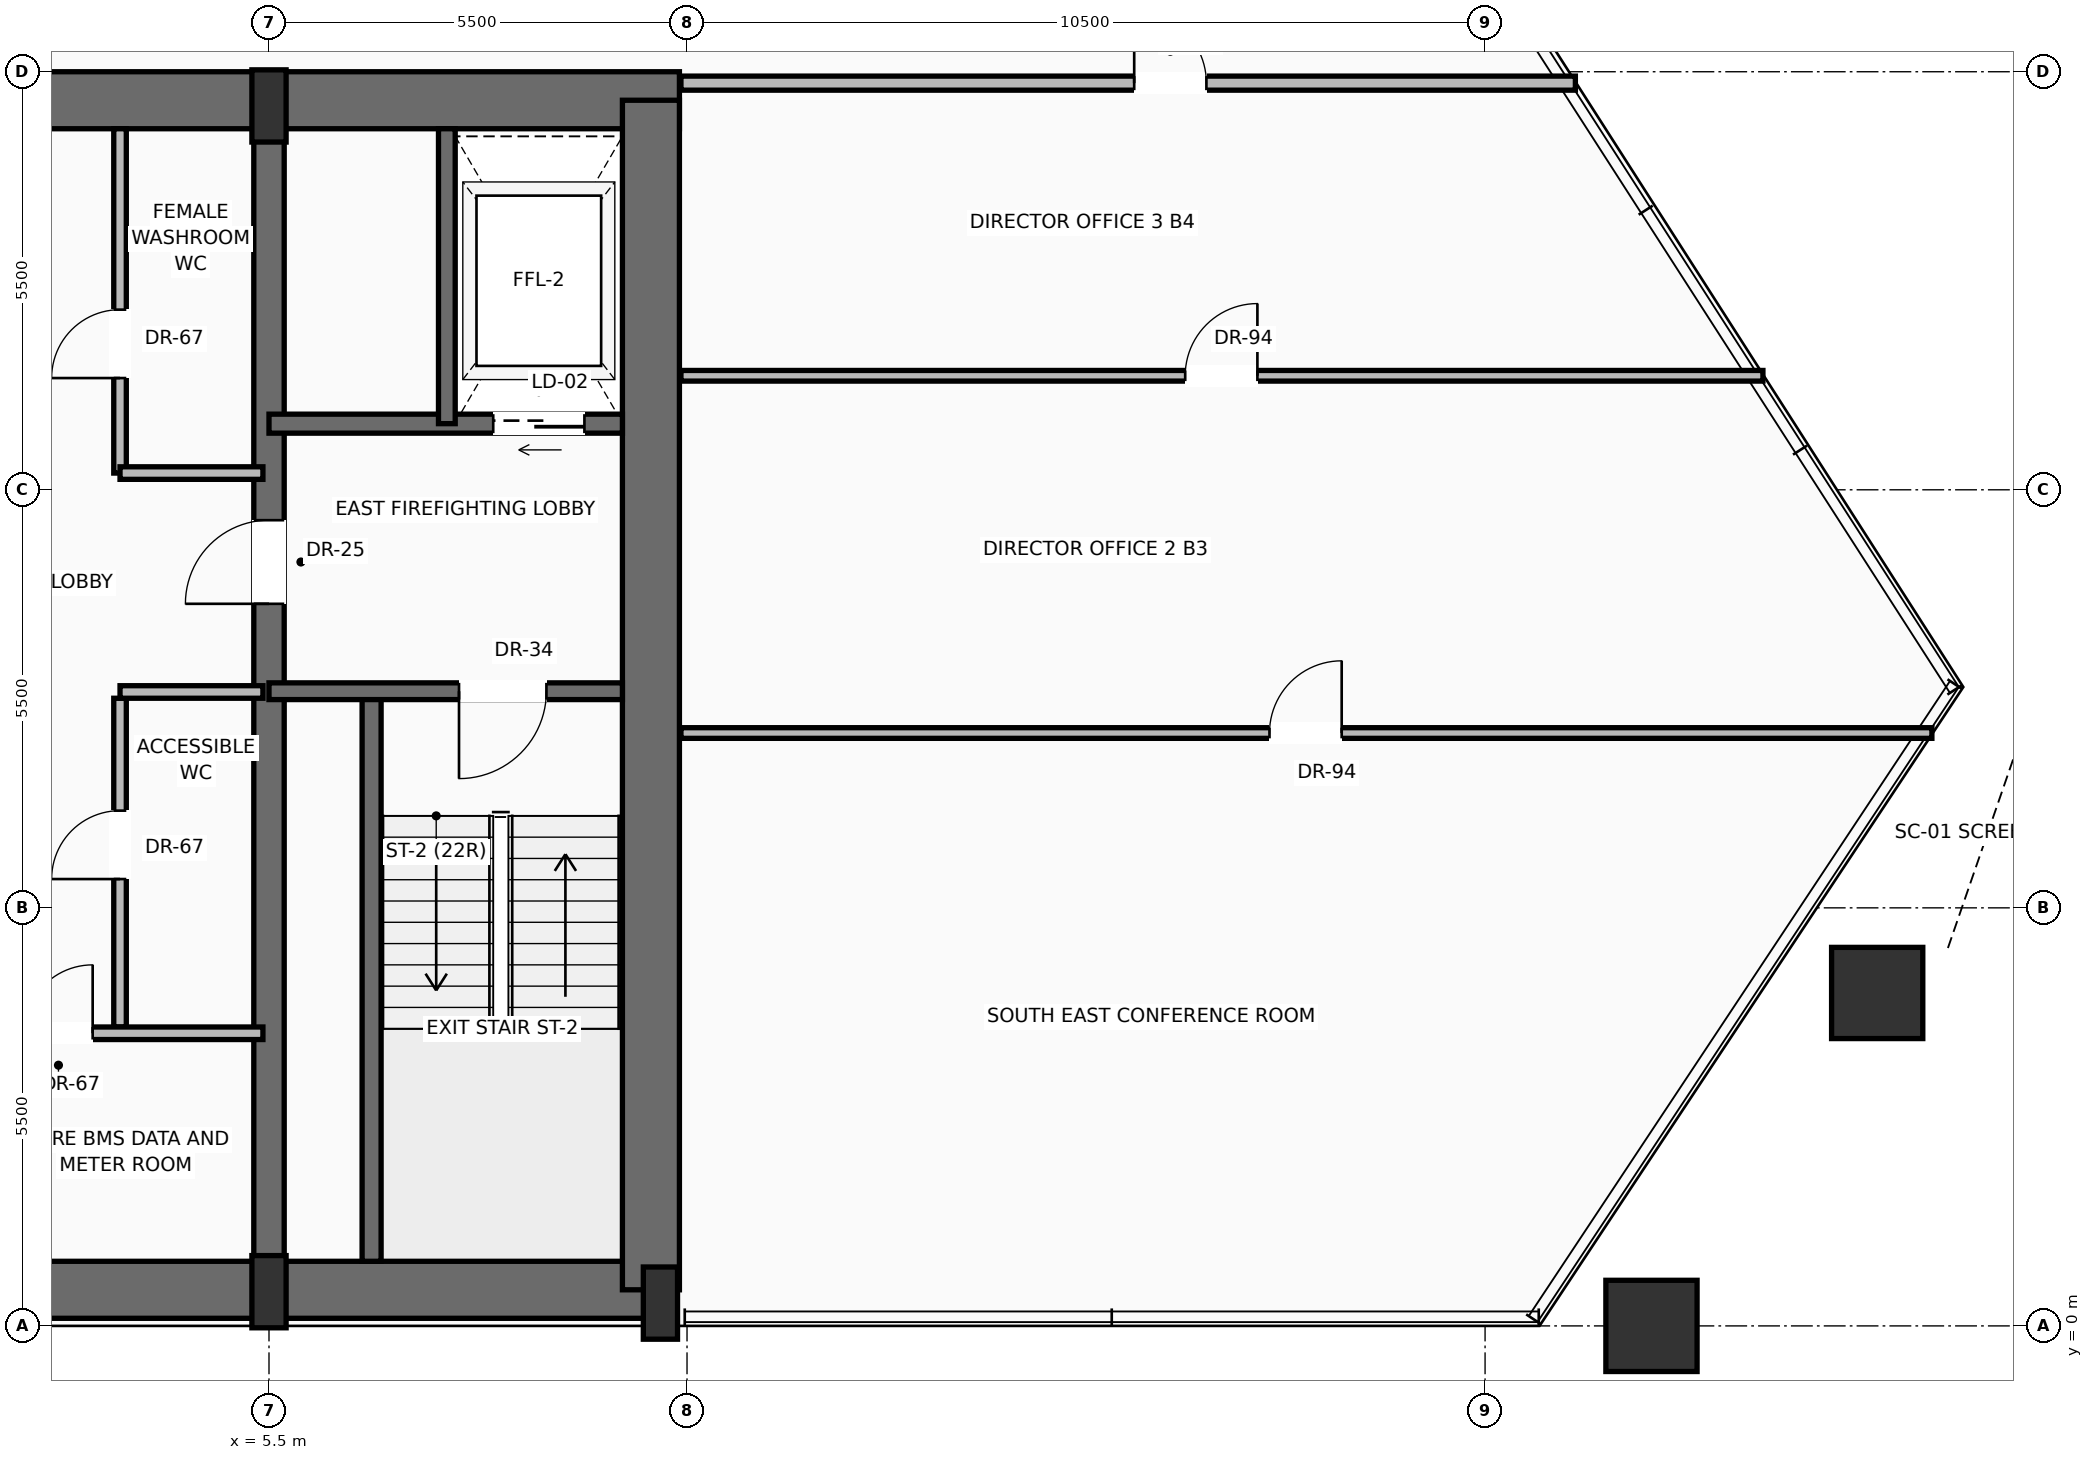
"""IFC4 building model, lengths in metres.
Left out: names, types, materials, properties, quantities, classifications, styles, units other than length and angle.
Written with IfcOpenShell. Run it as: python <this file> out.ifc"""

import sys

from ifc_helpers import new_model, si_unit, direction, frame, frame_2d, origin, origin_2d, place, context, subcontext, project, spatial, rectangle, hollow_rectangle, extrude, source, transform, mapped, element, fill, save


model = new_model("IFC4")
c1 = context("Model", 3, precision=1e-05, world=origin(), true_north=direction((0.0, 1.0)))
c2 = subcontext(c1, "Body", "Model", "MODEL_VIEW")
j1 = project(units=[si_unit("LENGTHUNIT", "METRE"), si_unit("PLANEANGLEUNIT", "RADIAN")], contexts=[c1])
p1 = place(None, origin())
s1 = spatial("IfcSite", under=j1, at=p1, CompositionType="ELEMENT")
p2 = place(p1, origin())
s2 = spatial("IfcBuilding", under=s1, at=p2, CompositionType="ELEMENT")
p3 = place(p2, frame((0.0, 0.0, 117.3)))
s3 = spatial("IfcBuildingStorey", under=s2, at=p3, CompositionType="ELEMENT", Elevation=117.3)
p4 = place(p3, frame((-10.65, 0.475, 0.0), z_axis=(0.0, 0.0, 1.0), x_axis=(1.0, 0.0, 0.0)))
e1 = element("IfcWall", 1, at=p4, inside=s3, PredefinedType="SHEAR", context=c2, shape_type="SweptSolid", body=[
    extrude(rectangle(XDim=21.3, YDim=0.75, at=frame_2d((10.65, 0.0))), origin(), (0.0, 0.0, 1.0), 3.42),
])
p5 = place(p3, frame((-10.9, 16.125, 0.0), z_axis=(0.0, 0.0, 1.0), x_axis=(1.0, 0.0, 0.0)))
e2 = element("IfcWall", 2, at=p5, inside=s3, PredefinedType="SHEAR", context=c2, shape_type="SweptSolid", body=[
    extrude(rectangle(XDim=21.8, YDim=0.75, at=frame_2d((10.9, 0.0))), origin(), (0.0, 0.0, 1.0), 3.42),
])
p6 = place(p5, frame((3.47, 0.0, 0.0)))
e3 = element("IfcOpeningElement", 3, at=p6, cuts=e2, PredefinedType="OPENING", context=c2, shape_type="SweptSolid", body=[
    extrude(rectangle(XDim=1.3, YDim=2.3, at=frame_2d((0.65, 1.15))), frame((0.0, 0.385, 0.0), z_axis=(0.0, -1.0, 0.0), x_axis=(1.0, 0.0, 0.0)), (0.0, 0.0, 1.0), 0.77),
])
p7 = place(p5, frame((9.9, 0.0, 0.0)))
e4 = element("IfcOpeningElement", 4, at=p7, cuts=e2, PredefinedType="OPENING", context=c2, shape_type="SweptSolid", body=[
    extrude(rectangle(XDim=2.0, YDim=2.4, at=frame_2d((1.0, 1.2))), frame((0.0, 0.385, 0.0), z_axis=(0.0, -1.0, 0.0), x_axis=(1.0, 0.0, 0.0)), (0.0, 0.0, 1.0), 0.77),
])
p8 = place(p3, frame((10.525, 0.475, 0.0), z_axis=(0.0, 0.0, 1.0), x_axis=(0.0, 1.0, 0.0)))
e5 = element("IfcWall", 5, at=p8, inside=s3, PredefinedType="SHEAR", context=c2, shape_type="SweptSolid", body=[
    extrude(rectangle(XDim=15.65, YDim=0.75, at=frame_2d((7.825, 0.0))), origin(), (0.0, 0.0, 1.0), 3.42),
])
p9 = place(p3, frame((5.5, 0.475, 0.0), z_axis=(0.0, 0.0, 1.0), x_axis=(0.0, 1.0, 0.0)))
e6 = element("IfcWall", 6, at=p9, inside=s3, PredefinedType="SHEAR", context=c2, shape_type="SweptSolid", body=[
    extrude(rectangle(XDim=15.65, YDim=0.4, at=frame_2d((7.825, 0.0))), origin(), (0.0, 0.0, 1.0), 3.42),
])
p10 = place(p9, frame((9.025, 0.0, 0.0)))
e7 = element("IfcOpeningElement", 7, at=p10, cuts=e6, PredefinedType="OPENING", context=c2, shape_type="SweptSolid", body=[
    extrude(rectangle(XDim=1.1, YDim=2.2, at=frame_2d((0.55, 1.1))), frame((0.0, 0.21, 0.0), z_axis=(0.0, -1.0, 0.0), x_axis=(1.0, 0.0, 0.0)), (0.0, 0.0, 1.0), 0.42),
])
m1 = source(origin(), c2, "Body", "SweptSolid", [
    extrude(rectangle(XDim=0.45, YDim=0.95, at=origin_2d()), origin(), (0.0, 0.0, 1.0), 3.7),
])
for number, where, z_axis, x_axis in (
    (8, (5.5, 0.45, 0.0), (0.0, 0.0, 1.0), (1.0, 0.0, 0.0)),
    (9, (10.65, 0.3, 0.0), (0.0, 0.0, 1.0), (1.0, 0.0, 0.0)),
    (10, (5.5, 16.05, 0.0), (0.0, 0.0, 1.0), (1.0, 0.0, 0.0)),
):
    element("IfcColumn", number, at=place(p3, frame(where, z_axis=z_axis, x_axis=x_axis)), inside=s3, PredefinedType="PILASTER", context=c2, shape_type="MappedRepresentation", body=[
        mapped(m1, transform((0.0, 0.0, 0.0), scale=1.0)),
    ])
m2 = source(origin(), c2, "Body", "SweptSolid", [
    extrude(hollow_rectangle(XDim=1.2, YDim=1.2, WallThickness=0.06, at=origin_2d()), origin(), (0.0, 0.0, 1.0), 3.691),
])
p11 = place(p3, frame((23.689, 0.0, 0.004), z_axis=(0.010449856009, 0.0, 0.999945398764), x_axis=(0.0, 1.0, 0.0)))
e11 = element("IfcColumn", 11, at=p11, inside=s3, PredefinedType="COLUMN", context=c2, shape_type="MappedRepresentation", body=[
    mapped(m2, transform((0.0, 0.0, 0.0), scale=1.0)),
])
m3 = source(origin(), c2, "Body", "SweptSolid", [
    extrude(hollow_rectangle(XDim=1.2, YDim=1.2, WallThickness=0.06, at=origin_2d()), origin(), (0.0, 0.0, 1.0), 3.692),
])
p12 = place(p3, frame((26.659, 4.38, 0.004), z_axis=(-0.002248546376, -0.015607557197, 0.999875666369), x_axis=(0.989781037653, -0.142595573221, 0.0)))
e12 = element("IfcColumn", 12, at=p12, inside=s3, PredefinedType="COLUMN", context=c2, shape_type="MappedRepresentation", body=[
    mapped(m3, transform((0.0, 0.0, 0.0), scale=1.0)),
])
p13 = place(p3, frame((6.85, 0.85, 0.0), z_axis=(0.0, 0.0, 1.0), x_axis=(0.0, 1.0, 0.0)))
e13 = element("IfcWall", 13, at=p13, inside=s3, PredefinedType="SOLIDWALL", context=c2, shape_type="SweptSolid", body=[
    extrude(rectangle(XDim=7.5, YDim=0.25, at=frame_2d((3.75, 0.0))), origin(), (0.0, 0.0, 1.0), 3.42),
])
p14 = place(p3, frame((10.15, 8.35, 0.0), z_axis=(0.0, 0.0, 1.0), x_axis=(-1.0, 0.0, 0.0)))
e14 = element("IfcWall", 14, at=p14, inside=s3, PredefinedType="SOLIDWALL", context=c2, shape_type="SweptSolid", body=[
    extrude(rectangle(XDim=4.65, YDim=0.22, at=frame_2d((2.325, 0.0))), origin(), (0.0, 0.0, 1.0), 3.42),
])
p15 = place(p14, frame((1.0, 0.0, 0.0)))
e15 = element("IfcOpeningElement", 15, at=p15, cuts=e14, PredefinedType="OPENING", context=c2, shape_type="SweptSolid", body=[
    extrude(rectangle(XDim=1.15, YDim=2.2, at=frame_2d((0.575, 1.1))), frame((0.0, 0.12, 0.0), z_axis=(0.0, -1.0, 0.0), x_axis=(1.0, 0.0, 0.0)), (0.0, 0.0, 1.0), 0.24),
])
p16 = place(p3, frame((10.15, 11.87, 0.0), z_axis=(0.0, 0.0, 1.0), x_axis=(-1.0, 0.0, 0.0)))
e16 = element("IfcWall", 16, at=p16, inside=s3, PredefinedType="SOLIDWALL", context=c2, shape_type="SweptSolid", body=[
    extrude(rectangle(XDim=4.65, YDim=0.25, at=frame_2d((2.325, 0.0))), origin(), (0.0, 0.0, 1.0), 3.42),
])
p17 = place(p16, frame((0.5, 0.0, 0.0)))
e17 = element("IfcOpeningElement", 17, at=p17, cuts=e16, PredefinedType="OPENING", context=c2, shape_type="SweptSolid", body=[
    extrude(rectangle(XDim=1.2, YDim=2.25, at=frame_2d((0.6, 1.125))), frame((0.0, 0.135, 0.0), z_axis=(0.0, -1.0, 0.0), x_axis=(1.0, 0.0, 0.0)), (0.0, 0.0, 1.0), 0.27),
])
p18 = place(p3, frame((7.84, 11.87, 0.0), z_axis=(0.0, 0.0, 1.0), x_axis=(0.0, 1.0, 0.0)))
e18 = element("IfcWall", 18, at=p18, inside=s3, PredefinedType="SOLIDWALL", context=c2, shape_type="SweptSolid", body=[
    extrude(rectangle(XDim=3.88, YDim=0.22, at=frame_2d((1.94, 0.0))), origin(), (0.0, 0.0, 1.0), 3.42),
])
p19 = place(p3, frame((3.54, 3.933, 0.0), z_axis=(0.0, 0.0, 1.0), x_axis=(0.0, 1.0, 0.0)))
e19 = element("IfcWall", 19, at=p19, inside=s3, PredefinedType="PARTITIONING", context=c2, shape_type="SweptSolid", body=[
    extrude(rectangle(XDim=4.325, YDim=0.165, at=frame_2d((2.163, 0.0))), origin(), (0.0, 0.0, 1.0), 3.412),
])
p20 = place(p19, frame((1.946, 0.0, 0.0)))
e20 = element("IfcOpeningElement", 20, at=p20, cuts=e19, PredefinedType="OPENING", context=c2, shape_type="SweptSolid", body=[
    extrude(rectangle(XDim=0.9, YDim=2.1, at=frame_2d((0.45, 1.05))), frame((0.0, 0.093, 0.0), z_axis=(0.0, -1.0, 0.0), x_axis=(1.0, 0.0, 0.0)), (0.0, 0.0, 1.0), 0.185),
])
p21 = place(p3, frame((3.54, 8.34, 0.0), z_axis=(0.0, 0.0, 1.0), x_axis=(1.0, 0.0, 0.0)))
e21 = element("IfcWall", 21, at=p21, inside=s3, PredefinedType="PARTITIONING", context=c2, shape_type="SweptSolid", body=[
    extrude(rectangle(XDim=1.88, YDim=0.165, at=frame_2d((0.94, 0.0))), origin(), (0.0, 0.0, 1.0), 3.412),
])
p22 = place(p3, frame((1.8, 3.85, 0.0), z_axis=(0.0, 0.0, 1.0), x_axis=(1.0, 0.0, 0.0)))
e22 = element("IfcWall", 22, at=p22, inside=s3, PredefinedType="PARTITIONING", context=c2, shape_type="SweptSolid", body=[
    extrude(rectangle(XDim=3.62, YDim=0.165, at=frame_2d((1.81, 0.0))), origin(), (0.0, 0.0, 1.0), 3.412),
])
p23 = place(p22, frame((0.48, 0.0, 0.0)))
e23 = element("IfcOpeningElement", 23, at=p23, cuts=e22, PredefinedType="OPENING", context=c2, shape_type="SweptSolid", body=[
    extrude(rectangle(XDim=0.9, YDim=2.1, at=frame_2d((0.45, 1.05))), frame((0.0, 0.093, 0.0), z_axis=(0.0, -1.0, 0.0), x_axis=(1.0, 0.0, 0.0)), (0.0, 0.0, 1.0), 0.185),
])
p24 = place(p3, frame((3.54, 11.22, 0.0), z_axis=(0.0, 0.0, 1.0), x_axis=(0.0, 1.0, 0.0)))
e24 = element("IfcWall", 24, at=p24, inside=s3, PredefinedType="PARTITIONING", context=c2, shape_type="SweptSolid", body=[
    extrude(rectangle(XDim=4.53, YDim=0.165, at=frame_2d((2.265, 0.0))), origin(), (0.0, 0.0, 1.0), 3.412),
])
p25 = place(p24, frame((1.25, 0.0, 0.0)))
e25 = element("IfcOpeningElement", 25, at=p25, cuts=e24, PredefinedType="OPENING", context=c2, shape_type="SweptSolid", body=[
    extrude(rectangle(XDim=0.9, YDim=2.1, at=frame_2d((0.45, 1.05))), frame((0.0, 0.093, 0.0), z_axis=(0.0, -1.0, 0.0), x_axis=(1.0, 0.0, 0.0)), (0.0, 0.0, 1.0), 0.185),
])
p26 = place(p3, frame((3.54, 11.22, 0.0), z_axis=(0.0, 0.0, 1.0), x_axis=(1.0, 0.0, 0.0)))
e26 = element("IfcWall", 26, at=p26, inside=s3, PredefinedType="PARTITIONING", context=c2, shape_type="SweptSolid", body=[
    extrude(rectangle(XDim=1.88, YDim=0.165, at=frame_2d((0.94, 0.0))), origin(), (0.0, 0.0, 1.0), 3.412),
])
p27 = place(p3, frame((10.92, 16.35, 0.0), z_axis=(0.0, 0.0, 1.0), x_axis=(1.0, 0.0, 0.0)))
e27 = element("IfcWall", 27, at=p27, inside=s3, PredefinedType="PARTITIONING", context=c2, shape_type="SweptSolid", body=[
    extrude(rectangle(XDim=11.768, YDim=0.185, at=frame_2d((5.884, 0.0))), origin(), (0.0, 0.0, 1.0), 2.717),
])
p28 = place(p27, frame((5.963, 0.0, 0.0)))
e28 = element("IfcOpeningElement", 28, at=p28, cuts=e27, PredefinedType="OPENING", context=c2, shape_type="SweptSolid", body=[
    extrude(rectangle(XDim=0.95, YDim=2.2, at=frame_2d((0.475, 1.1))), frame((0.0, 0.103, 0.0), z_axis=(0.0, -1.0, 0.0), x_axis=(1.0, 0.0, 0.0)), (0.0, 0.0, 1.0), 0.205),
])
p29 = place(p3, frame((10.92, 7.8, 0.0), z_axis=(0.0, 0.0, 1.0), x_axis=(1.0, 0.0, 0.0)))
e29 = element("IfcWall", 29, at=p29, inside=s3, PredefinedType="PARTITIONING", context=c2, shape_type="SweptSolid", body=[
    extrude(rectangle(XDim=16.459, YDim=0.14, at=frame_2d((8.229, 0.0))), origin(), (0.0, 0.0, 1.0), 3.412),
])
p30 = place(p29, frame((7.743, 0.0, 0.0)))
e30 = element("IfcOpeningElement", 30, at=p30, cuts=e29, PredefinedType="OPENING", context=c2, shape_type="SweptSolid", body=[
    extrude(rectangle(XDim=0.95, YDim=2.2, at=frame_2d((0.475, 1.1))), frame((0.0, 0.08, 0.0), z_axis=(0.0, -1.0, 0.0), x_axis=(1.0, 0.0, 0.0)), (0.0, 0.0, 1.0), 0.16),
])
p31 = place(p3, frame((10.92, 12.5, 0.0), z_axis=(0.0, 0.0, 1.0), x_axis=(1.0, 0.0, 0.0)))
e31 = element("IfcWall", 31, at=p31, inside=s3, PredefinedType="PARTITIONING", context=c2, shape_type="SweptSolid", body=[
    extrude(rectangle(XDim=14.236, YDim=0.14, at=frame_2d((7.118, 0.0))), origin(), (0.0, 0.0, 1.0), 3.412),
])
p32 = place(p31, frame((6.635, 0.0, 0.0)))
e32 = element("IfcOpeningElement", 32, at=p32, cuts=e31, PredefinedType="OPENING", context=c2, shape_type="SweptSolid", body=[
    extrude(rectangle(XDim=0.95, YDim=2.2, at=frame_2d((0.475, 1.1))), frame((0.0, 0.08, 0.0), z_axis=(0.0, -1.0, 0.0), x_axis=(1.0, 0.0, 0.0)), (0.0, 0.0, 1.0), 0.16),
])
m4 = source(origin(), c2, "Body", "SweptSolid", [
    extrude(rectangle(XDim=1.15, YDim=2.2, at=frame_2d((0.575, 1.1))), frame((0.0, 0.025, 0.0), z_axis=(0.0, -1.0, 0.0), x_axis=(1.0, 0.0, 0.0)), (0.0, 0.0, 1.0), 0.05),
])
p33 = place(p15, origin())
e33 = element("IfcDoor", 33, at=p33, inside=s3, OperationType="SINGLE_SWING_RIGHT", PredefinedType="DOOR", context=c2, shape_type="MappedRepresentation", body=[
    mapped(m4, transform((0.0, 0.0, 0.0), scale=1.0)),
])
fill(e15, e33)
m5 = source(origin(), c2, "Body", "SweptSolid", [
    extrude(rectangle(XDim=1.1, YDim=2.2, at=frame_2d((0.55, 1.1))), frame((0.0, 0.025, 0.0), z_axis=(0.0, -1.0, 0.0), x_axis=(1.0, 0.0, 0.0)), (0.0, 0.0, 1.0), 0.05),
])
p34 = place(p10, origin())
e34 = element("IfcDoor", 34, at=p34, inside=s3, OperationType="SINGLE_SWING_LEFT", PredefinedType="DOOR", context=c2, shape_type="MappedRepresentation", body=[
    mapped(m5, transform((0.0, 0.0, 0.0), scale=1.0)),
])
fill(e7, e34)
m6 = source(origin(), c2, "Body", "SweptSolid", [
    extrude(rectangle(XDim=1.2, YDim=2.25, at=frame_2d((0.6, 1.125))), frame((0.0, 0.025, 0.0), z_axis=(0.0, -1.0, 0.0), x_axis=(1.0, 0.0, 0.0)), (0.0, 0.0, 1.0), 0.05),
])
p35 = place(p17, origin())
e35 = element("IfcDoor", 35, at=p35, inside=s3, OperationType="SLIDING_TO_RIGHT", PredefinedType="DOOR", context=c2, shape_type="MappedRepresentation", body=[
    mapped(m6, transform((0.0, 0.0, 0.0), scale=1.0)),
])
fill(e17, e35)
m7 = source(origin(), c2, "Body", "SweptSolid", [
    extrude(rectangle(XDim=0.9, YDim=2.1, at=frame_2d((0.45, 1.05))), frame((0.0, 0.025, 0.0), z_axis=(0.0, -1.0, 0.0), x_axis=(1.0, 0.0, 0.0)), (0.0, 0.0, 1.0), 0.05),
])
p36 = place(p23, origin())
e36 = element("IfcDoor", 36, at=p36, inside=s3, OperationType="SINGLE_SWING_RIGHT", PredefinedType="DOOR", context=c2, shape_type="MappedRepresentation", body=[
    mapped(m7, transform((0.0, 0.0, 0.0), scale=1.0)),
])
fill(e23, e36)
p37 = place(p20, origin())
e37 = element("IfcDoor", 37, at=p37, inside=s3, OperationType="SINGLE_SWING_LEFT", PredefinedType="DOOR", context=c2, shape_type="MappedRepresentation", body=[
    mapped(m7, transform((0.0, 0.0, 0.0), scale=1.0)),
])
fill(e20, e37)
p38 = place(p25, origin())
e38 = element("IfcDoor", 38, at=p38, inside=s3, OperationType="SINGLE_SWING_LEFT", PredefinedType="DOOR", context=c2, shape_type="MappedRepresentation", body=[
    mapped(m7, transform((0.0, 0.0, 0.0), scale=1.0)),
])
fill(e25, e38)
m8 = source(origin(), c2, "Body", "SweptSolid", [
    extrude(rectangle(XDim=0.95, YDim=2.2, at=frame_2d((0.475, 1.1))), frame((0.0, 0.025, 0.0), z_axis=(0.0, -1.0, 0.0), x_axis=(1.0, 0.0, 0.0)), (0.0, 0.0, 1.0), 0.05),
])
p39 = place(p28, origin())
e39 = element("IfcDoor", 39, at=p39, inside=s3, OperationType="SINGLE_SWING_LEFT", PredefinedType="DOOR", context=c2, shape_type="MappedRepresentation", body=[
    mapped(m8, transform((0.0, 0.0, 0.0), scale=1.0)),
])
fill(e28, e39)
p40 = place(p32, origin())
e40 = element("IfcDoor", 40, at=p40, inside=s3, OperationType="SINGLE_SWING_RIGHT", PredefinedType="DOOR", context=c2, shape_type="MappedRepresentation", body=[
    mapped(m8, transform((0.0, 0.0, 0.0), scale=1.0)),
])
fill(e32, e40)
p41 = place(p30, origin())
e41 = element("IfcDoor", 41, at=p41, inside=s3, OperationType="SINGLE_SWING_RIGHT", PredefinedType="DOOR", context=c2, shape_type="MappedRepresentation", body=[
    mapped(m8, transform((0.0, 0.0, 0.0), scale=1.0)),
])
fill(e30, e41)
save(model, sys.argv[1])
